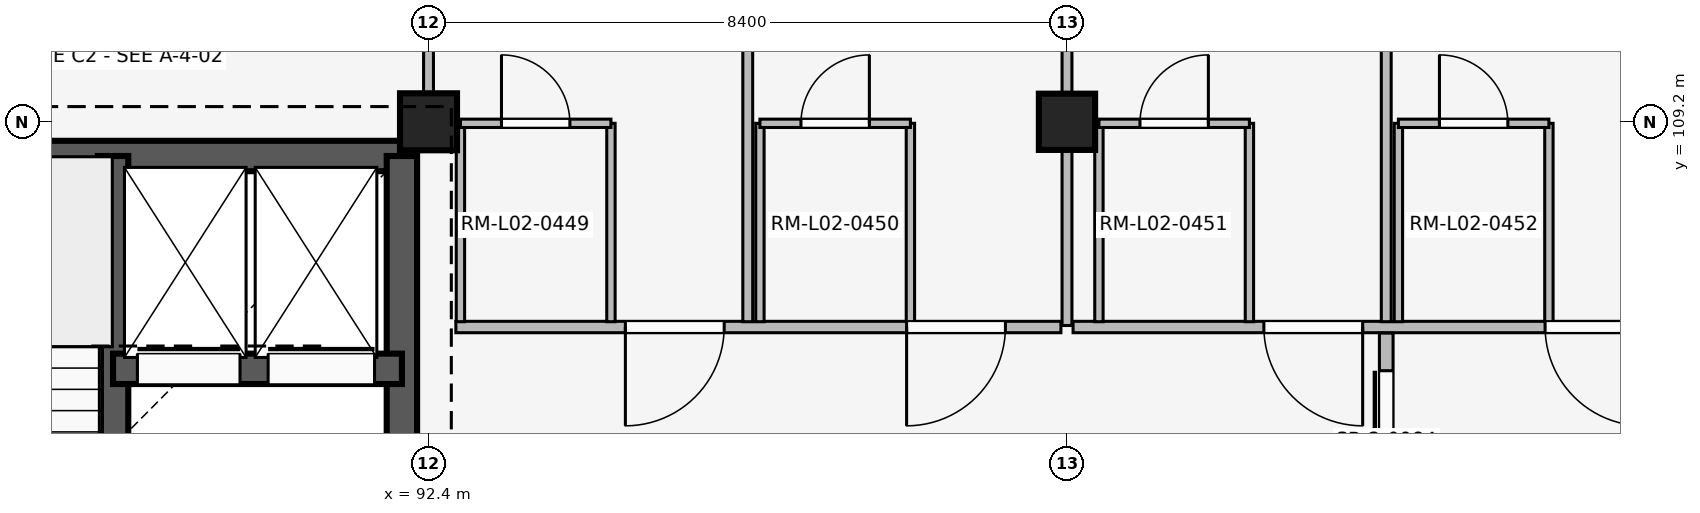
"""IFC4 building model, lengths in metres.
Left out: names, types, materials, properties, quantities, classifications, styles, units other than length and angle.
Written with IfcOpenShell. Run it as: python <this file> out.ifc"""

import sys

from ifc_helpers import new_model, si_unit, direction, frame, frame_2d, origin, origin_2d, place, context, subcontext, project, spatial, rectangle, extrude, element, fill, save


model = new_model("IFC4")
c1 = context("Model", 3, precision=1e-05, world=origin(), true_north=direction((0.0, 1.0)))
c2 = subcontext(c1, "Body", "Model", "MODEL_VIEW")
j1 = project(units=[si_unit("LENGTHUNIT", "METRE"), si_unit("PLANEANGLEUNIT", "RADIAN")], contexts=[c1])
p1 = place(None, origin())
s1 = spatial("IfcSite", under=j1, at=p1, CompositionType="ELEMENT")
p2 = place(p1, origin())
s2 = spatial("IfcBuilding", under=s1, at=p2, CompositionType="ELEMENT")
p3 = place(p2, frame((0.0, 0.0, 8.1)))
s3 = spatial("IfcBuildingStorey", under=s2, at=p3, CompositionType="ELEMENT", Elevation=8.1)
p4 = place(p3, frame((92.4, 109.2, 0.0), z_axis=(0.0, 0.0, 1.0), x_axis=(1.0, 0.0, 0.0)))
e1 = element("IfcColumn", 1, at=p4, inside=s3, PredefinedType="COLUMN", context=c2, shape_type="SweptSolid", body=[
    extrude(rectangle(XDim=0.75, YDim=0.75, at=origin_2d()), origin(), (0.0, 0.0, 1.0), 4.8),
])
p5 = place(p3, frame((100.8, 109.2, 0.0), z_axis=(0.0, 0.0, 1.0), x_axis=(1.0, 0.0, 0.0)))
e2 = element("IfcColumn", 2, at=p5, inside=s3, PredefinedType="COLUMN", context=c2, shape_type="SweptSolid", body=[
    extrude(rectangle(XDim=0.74, YDim=0.74, at=origin_2d()), origin(), (0.0, 0.0, 1.0), 4.8),
])
p6 = place(p3, frame((84.55, 108.75, 0.0), z_axis=(0.0, 0.0, 1.0), x_axis=(1.0, 0.0, 0.0)))
e3 = element("IfcWall", 3, at=p6, inside=s3, PredefinedType="SHEAR", context=c2, shape_type="SweptSolid", body=[
    extrude(rectangle(XDim=7.5, YDim=0.4, at=frame_2d((3.75, 0.0))), origin(), (0.0, 0.0, 1.0), 4.52),
])
p7 = place(p3, frame((92.05, 101.2, 0.0), z_axis=(0.0, 0.0, 1.0), x_axis=(0.0, 1.0, 0.0)))
e4 = element("IfcWall", 4, at=p7, inside=s3, PredefinedType="SHEAR", context=c2, shape_type="SweptSolid", body=[
    extrude(rectangle(XDim=7.55, YDim=0.4, at=frame_2d((3.775, 0.0))), origin(), (0.0, 0.0, 1.0), 4.52),
])
p8 = place(p7, frame((2.4, 0.0, 0.0)))
e5 = element("IfcOpeningElement", 5, at=p8, cuts=e4, PredefinedType="OPENING", context=c2, shape_type="SweptSolid", body=[
    extrude(rectangle(XDim=1.2, YDim=2.2, at=frame_2d((0.6, 1.1))), frame((0.0, 0.21, 0.0), z_axis=(0.0, -1.0, 0.0), x_axis=(1.0, 0.0, 0.0)), (0.0, 0.0, 1.0), 0.42),
])
p9 = place(p3, frame((88.25, 101.2, 0.0), z_axis=(0.0, 0.0, 1.0), x_axis=(0.0, 1.0, 0.0)))
e6 = element("IfcWall", 6, at=p9, inside=s3, PredefinedType="SHEAR", context=c2, shape_type="SweptSolid", body=[
    extrude(rectangle(XDim=7.55, YDim=0.4, at=frame_2d((3.775, 0.0))), origin(), (0.0, 0.0, 1.0), 4.52),
])
p10 = place(p9, frame((0.28, 0.0, 0.0)))
e7 = element("IfcOpeningElement", 7, at=p10, cuts=e6, PredefinedType="OPENING", context=c2, shape_type="SweptSolid", body=[
    extrude(rectangle(XDim=1.0, YDim=2.15, at=frame_2d((0.5, 1.075))), frame((0.0, 0.21, 0.0), z_axis=(0.0, -1.0, 0.0), x_axis=(1.0, 0.0, 0.0)), (0.0, 0.0, 1.0), 0.42),
])
p11 = place(p3, frame((88.25, 105.95, 0.0), z_axis=(0.0, 0.0, 1.0), x_axis=(1.0, 0.0, 0.0)))
e8 = element("IfcWall", 8, at=p11, inside=s3, PredefinedType="SHEAR", context=c2, shape_type="SweptSolid", body=[
    extrude(rectangle(XDim=3.8, YDim=0.4, at=frame_2d((1.9, 0.0))), origin(), (0.0, 0.0, 1.0), 4.52),
])
p12 = place(p11, frame((0.32, 0.0, 0.0)))
e9 = element("IfcOpeningElement", 9, at=p12, cuts=e8, PredefinedType="OPENING", context=c2, shape_type="SweptSolid", body=[
    extrude(rectangle(XDim=1.35, YDim=2.25, at=frame_2d((0.675, 1.125))), frame((0.0, 0.21, 0.0), z_axis=(0.0, -1.0, 0.0), x_axis=(1.0, 0.0, 0.0)), (0.0, 0.0, 1.0), 0.42),
])
p13 = place(p11, frame((2.04, 0.0, 0.0)))
e10 = element("IfcOpeningElement", 10, at=p13, cuts=e8, PredefinedType="OPENING", context=c2, shape_type="SweptSolid", body=[
    extrude(rectangle(XDim=1.4, YDim=2.25, at=frame_2d((0.7, 1.125))), frame((0.0, 0.21, 0.0), z_axis=(0.0, -1.0, 0.0), x_axis=(1.0, 0.0, 0.0)), (0.0, 0.0, 1.0), 0.42),
])
p14 = place(p3, frame((92.4, 109.55, 0.0), z_axis=(0.0, 0.0, 1.0), x_axis=(0.0, 1.0, 0.0)))
e11 = element("IfcWall", 11, at=p14, inside=s3, PredefinedType="PARTITIONING", context=c2, shape_type="SweptSolid", body=[
    extrude(rectangle(XDim=7.91, YDim=0.13, at=frame_2d((3.955, 0.0))), origin(), (0.0, 0.0, 1.0), 3.84),
])
p15 = place(p14, frame((3.4, 0.0, 0.0)))
e12 = element("IfcOpeningElement", 12, at=p15, cuts=e11, PredefinedType="OPENING", context=c2, shape_type="SweptSolid", body=[
    extrude(rectangle(XDim=1.05, YDim=2.2, at=frame_2d((0.525, 1.1))), frame((0.0, 0.075, 0.0), z_axis=(0.0, -1.0, 0.0), x_axis=(1.0, 0.0, 0.0)), (0.0, 0.0, 1.0), 0.15),
])
p16 = place(p3, frame((100.72, 106.5, 0.0), z_axis=(0.0, 0.0, 1.0), x_axis=(-1.0, 0.0, 0.0)))
e13 = element("IfcWall", 13, at=p16, inside=s3, PredefinedType="PARTITIONING", context=c2, shape_type="SweptSolid", body=[
    extrude(rectangle(XDim=7.96, YDim=0.15, at=frame_2d((3.98, 0.0))), origin(), (0.0, 0.0, 1.0), 3.84),
])
p17 = place(p16, frame((0.73, 0.0, 0.0)))
e14 = element("IfcOpeningElement", 14, at=p17, cuts=e13, PredefinedType="OPENING", context=c2, shape_type="SweptSolid", body=[
    extrude(rectangle(XDim=1.3, YDim=2.25, at=frame_2d((0.65, 1.125))), frame((0.0, 0.085, 0.0), z_axis=(0.0, -1.0, 0.0), x_axis=(1.0, 0.0, 0.0)), (0.0, 0.0, 1.0), 0.17),
])
p18 = place(p16, frame((4.43, 0.0, 0.0)))
e15 = element("IfcOpeningElement", 15, at=p18, cuts=e13, PredefinedType="OPENING", context=c2, shape_type="SweptSolid", body=[
    extrude(rectangle(XDim=1.3, YDim=2.25, at=frame_2d((0.65, 1.125))), frame((0.0, 0.085, 0.0), z_axis=(0.0, -1.0, 0.0), x_axis=(1.0, 0.0, 0.0)), (0.0, 0.0, 1.0), 0.17),
])
p19 = place(p3, frame((96.6, 106.57, 0.0), z_axis=(0.0, 0.0, 1.0), x_axis=(0.0, 1.0, 0.0)))
e16 = element("IfcWall", 16, at=p19, inside=s3, PredefinedType="PARTITIONING", context=c2, shape_type="SweptSolid", body=[
    extrude(rectangle(XDim=10.93, YDim=0.13, at=frame_2d((5.465, 0.0))), origin(), (0.0, 0.0, 1.0), 3.84),
])
for number, where, z_axis, x_axis in (
    (17, (92.82, 106.57, 0.0), (0.0, 0.0, 1.0), (0.0, 1.0, 0.0)),
    (18, (94.8, 106.57, 0.0), (0.0, 0.0, 1.0), (0.0, 1.0, 0.0)),
):
    element("IfcWall", number, at=place(p3, frame(where, z_axis=z_axis, x_axis=x_axis)), inside=s3, PredefinedType="PARTITIONING", context=c2, shape_type="SweptSolid", body=[
        extrude(rectangle(XDim=2.61, YDim=0.11, at=frame_2d((1.305, 0.0))), origin(), (0.0, 0.0, 1.0), 3.84),
    ])
p20 = place(p3, frame((92.82, 109.18, 0.0), z_axis=(0.0, 0.0, 1.0), x_axis=(1.0, 0.0, 0.0)))
e19 = element("IfcWall", 19, at=p20, inside=s3, PredefinedType="PARTITIONING", context=c2, shape_type="SweptSolid", body=[
    extrude(rectangle(XDim=1.98, YDim=0.11, at=frame_2d((0.99, 0.0))), origin(), (0.0, 0.0, 1.0), 3.84),
])
p21 = place(p20, frame((0.54, 0.0, 0.0)))
e20 = element("IfcOpeningElement", 20, at=p21, cuts=e19, PredefinedType="OPENING", context=c2, shape_type="SweptSolid", body=[
    extrude(rectangle(XDim=0.9, YDim=2.1, at=frame_2d((0.45, 1.05))), frame((0.0, 0.065, 0.0), z_axis=(0.0, -1.0, 0.0), x_axis=(1.0, 0.0, 0.0)), (0.0, 0.0, 1.0), 0.13),
])
for number, where, z_axis, x_axis in (
    (21, (96.76, 106.57, 0.0), (0.0, 0.0, 1.0), (0.0, 1.0, 0.0)),
    (22, (98.74, 106.57, 0.0), (0.0, 0.0, 1.0), (0.0, 1.0, 0.0)),
):
    element("IfcWall", number, at=place(p3, frame(where, z_axis=z_axis, x_axis=x_axis)), inside=s3, PredefinedType="PARTITIONING", context=c2, shape_type="SweptSolid", body=[
        extrude(rectangle(XDim=2.61, YDim=0.11, at=frame_2d((1.305, 0.0))), origin(), (0.0, 0.0, 1.0), 3.84),
    ])
p22 = place(p3, frame((96.76, 109.18, 0.0), z_axis=(0.0, 0.0, 1.0), x_axis=(1.0, 0.0, 0.0)))
e23 = element("IfcWall", 23, at=p22, inside=s3, PredefinedType="PARTITIONING", context=c2, shape_type="SweptSolid", body=[
    extrude(rectangle(XDim=1.98, YDim=0.11, at=frame_2d((0.99, 0.0))), origin(), (0.0, 0.0, 1.0), 3.84),
])
p23 = place(p22, frame((0.54, 0.0, 0.0)))
e24 = element("IfcOpeningElement", 24, at=p23, cuts=e23, PredefinedType="OPENING", context=c2, shape_type="SweptSolid", body=[
    extrude(rectangle(XDim=0.9, YDim=2.1, at=frame_2d((0.45, 1.05))), frame((0.0, 0.065, 0.0), z_axis=(0.0, -1.0, 0.0), x_axis=(1.0, 0.0, 0.0)), (0.0, 0.0, 1.0), 0.13),
])
p24 = place(p3, frame((100.8, 106.52, 0.0), z_axis=(0.0, 0.0, 1.0), x_axis=(0.0, 1.0, 0.0)))
e25 = element("IfcWall", 25, at=p24, inside=s3, PredefinedType="PARTITIONING", context=c2, shape_type="SweptSolid", body=[
    extrude(rectangle(XDim=10.94, YDim=0.13, at=frame_2d((5.47, 0.0))), origin(), (0.0, 0.0, 1.0), 3.84),
])
p25 = place(p3, frame((109.12, 106.5, 0.0), z_axis=(0.0, 0.0, 1.0), x_axis=(-1.0, 0.0, 0.0)))
e26 = element("IfcWall", 26, at=p25, inside=s3, PredefinedType="PARTITIONING", context=c2, shape_type="SweptSolid", body=[
    extrude(rectangle(XDim=8.24, YDim=0.15, at=frame_2d((4.12, 0.0))), origin(), (0.0, 0.0, 1.0), 3.84),
])
p26 = place(p25, frame((0.73, 0.0, 0.0)))
e27 = element("IfcOpeningElement", 27, at=p26, cuts=e26, PredefinedType="OPENING", context=c2, shape_type="SweptSolid", body=[
    extrude(rectangle(XDim=1.3, YDim=2.25, at=frame_2d((0.65, 1.125))), frame((0.0, 0.085, 0.0), z_axis=(0.0, -1.0, 0.0), x_axis=(1.0, 0.0, 0.0)), (0.0, 0.0, 1.0), 0.17),
])
p27 = place(p25, frame((4.43, 0.0, 0.0)))
e28 = element("IfcOpeningElement", 28, at=p27, cuts=e26, PredefinedType="OPENING", context=c2, shape_type="SweptSolid", body=[
    extrude(rectangle(XDim=1.3, YDim=2.25, at=frame_2d((0.65, 1.125))), frame((0.0, 0.085, 0.0), z_axis=(0.0, -1.0, 0.0), x_axis=(1.0, 0.0, 0.0)), (0.0, 0.0, 1.0), 0.17),
])
p28 = place(p3, frame((105.0, 106.57, 0.0), z_axis=(0.0, 0.0, 1.0), x_axis=(0.0, 1.0, 0.0)))
e29 = element("IfcWall", 29, at=p28, inside=s3, PredefinedType="PARTITIONING", context=c2, shape_type="SweptSolid", body=[
    extrude(rectangle(XDim=10.93, YDim=0.13, at=frame_2d((5.465, 0.0))), origin(), (0.0, 0.0, 1.0), 3.84),
])
for number, where, z_axis, x_axis in (
    (30, (101.22, 106.57, 0.0), (0.0, 0.0, 1.0), (0.0, 1.0, 0.0)),
    (31, (103.2, 106.57, 0.0), (0.0, 0.0, 1.0), (0.0, 1.0, 0.0)),
):
    element("IfcWall", number, at=place(p3, frame(where, z_axis=z_axis, x_axis=x_axis)), inside=s3, PredefinedType="PARTITIONING", context=c2, shape_type="SweptSolid", body=[
        extrude(rectangle(XDim=2.61, YDim=0.11, at=frame_2d((1.305, 0.0))), origin(), (0.0, 0.0, 1.0), 3.84),
    ])
p29 = place(p3, frame((101.22, 109.18, 0.0), z_axis=(0.0, 0.0, 1.0), x_axis=(1.0, 0.0, 0.0)))
e32 = element("IfcWall", 32, at=p29, inside=s3, PredefinedType="PARTITIONING", context=c2, shape_type="SweptSolid", body=[
    extrude(rectangle(XDim=1.98, YDim=0.11, at=frame_2d((0.99, 0.0))), origin(), (0.0, 0.0, 1.0), 3.84),
])
p30 = place(p29, frame((0.54, 0.0, 0.0)))
e33 = element("IfcOpeningElement", 33, at=p30, cuts=e32, PredefinedType="OPENING", context=c2, shape_type="SweptSolid", body=[
    extrude(rectangle(XDim=0.9, YDim=2.1, at=frame_2d((0.45, 1.05))), frame((0.0, 0.065, 0.0), z_axis=(0.0, -1.0, 0.0), x_axis=(1.0, 0.0, 0.0)), (0.0, 0.0, 1.0), 0.13),
])
for number, where, z_axis, x_axis in (
    (34, (105.16, 106.57, 0.0), (0.0, 0.0, 1.0), (0.0, 1.0, 0.0)),
    (35, (107.14, 106.57, 0.0), (0.0, 0.0, 1.0), (0.0, 1.0, 0.0)),
):
    element("IfcWall", number, at=place(p3, frame(where, z_axis=z_axis, x_axis=x_axis)), inside=s3, PredefinedType="PARTITIONING", context=c2, shape_type="SweptSolid", body=[
        extrude(rectangle(XDim=2.61, YDim=0.11, at=frame_2d((1.305, 0.0))), origin(), (0.0, 0.0, 1.0), 3.84),
    ])
p31 = place(p3, frame((105.16, 109.18, 0.0), z_axis=(0.0, 0.0, 1.0), x_axis=(1.0, 0.0, 0.0)))
e36 = element("IfcWall", 36, at=p31, inside=s3, PredefinedType="PARTITIONING", context=c2, shape_type="SweptSolid", body=[
    extrude(rectangle(XDim=1.98, YDim=0.11, at=frame_2d((0.99, 0.0))), origin(), (0.0, 0.0, 1.0), 3.84),
])
p32 = place(p31, frame((0.54, 0.0, 0.0)))
e37 = element("IfcOpeningElement", 37, at=p32, cuts=e36, PredefinedType="OPENING", context=c2, shape_type="SweptSolid", body=[
    extrude(rectangle(XDim=0.9, YDim=2.1, at=frame_2d((0.45, 1.05))), frame((0.0, 0.065, 0.0), z_axis=(0.0, -1.0, 0.0), x_axis=(1.0, 0.0, 0.0)), (0.0, 0.0, 1.0), 0.13),
])
p33 = place(p3, frame((105.0, 103.58, 0.0), z_axis=(0.0, 0.0, 1.0), x_axis=(0.0, 1.0, 0.0)))
e38 = element("IfcWall", 38, at=p33, inside=s3, PredefinedType="PARTITIONING", context=c2, shape_type="SweptSolid", body=[
    extrude(rectangle(XDim=2.84, YDim=0.18, at=frame_2d((1.42, 0.0))), origin(), (0.0, 0.0, 1.0), 3.84),
])
p34 = place(p33, frame((0.495, 0.0, 0.0)))
e39 = element("IfcOpeningElement", 39, at=p34, cuts=e38, PredefinedType="OPENING", context=c2, shape_type="SweptSolid", body=[
    extrude(rectangle(XDim=1.85, YDim=2.3, at=frame_2d((0.925, 1.15))), frame((0.0, 0.1, 0.0), z_axis=(0.0, -1.0, 0.0), x_axis=(1.0, 0.0, 0.0)), (0.0, 0.0, 1.0), 0.2),
])
p35 = place(p12, origin())
e40 = element("IfcDoor", 40, at=p35, inside=s3, OperationType="SLIDING_TO_LEFT", PredefinedType="DOOR", context=c2, shape_type="SweptSolid", body=[
    extrude(rectangle(XDim=1.35, YDim=2.25, at=frame_2d((0.675, 1.125))), frame((0.0, 0.025, 0.0), z_axis=(0.0, -1.0, 0.0), x_axis=(1.0, 0.0, 0.0)), (0.0, 0.0, 1.0), 0.05),
])
fill(e9, e40)
p36 = place(p13, origin())
e41 = element("IfcDoor", 41, at=p36, inside=s3, OperationType="SLIDING_TO_LEFT", PredefinedType="DOOR", context=c2, shape_type="SweptSolid", body=[
    extrude(rectangle(XDim=1.4, YDim=2.25, at=frame_2d((0.7, 1.125))), frame((0.0, 0.025, 0.0), z_axis=(0.0, -1.0, 0.0), x_axis=(1.0, 0.0, 0.0)), (0.0, 0.0, 1.0), 0.05),
])
fill(e10, e41)
p37 = place(p17, origin())
e42 = element("IfcDoor", 42, at=p37, inside=s3, OperationType="SINGLE_SWING_RIGHT", PredefinedType="DOOR", context=c2, shape_type="SweptSolid", body=[
    extrude(rectangle(XDim=1.3, YDim=2.25, at=frame_2d((0.65, 1.125))), frame((0.0, 0.025, 0.0), z_axis=(0.0, -1.0, 0.0), x_axis=(1.0, 0.0, 0.0)), (0.0, 0.0, 1.0), 0.05),
])
fill(e14, e42)
p38 = place(p18, origin())
e43 = element("IfcDoor", 43, at=p38, inside=s3, OperationType="SINGLE_SWING_RIGHT", PredefinedType="DOOR", context=c2, shape_type="SweptSolid", body=[
    extrude(rectangle(XDim=1.3, YDim=2.25, at=frame_2d((0.65, 1.125))), frame((0.0, 0.025, 0.0), z_axis=(0.0, -1.0, 0.0), x_axis=(1.0, 0.0, 0.0)), (0.0, 0.0, 1.0), 0.05),
])
fill(e15, e43)
p39 = place(p21, origin())
e44 = element("IfcDoor", 44, at=p39, inside=s3, OperationType="SINGLE_SWING_LEFT", PredefinedType="DOOR", context=c2, shape_type="SweptSolid", body=[
    extrude(rectangle(XDim=0.9, YDim=2.1, at=frame_2d((0.45, 1.05))), frame((0.0, 0.025, 0.0), z_axis=(0.0, -1.0, 0.0), x_axis=(1.0, 0.0, 0.0)), (0.0, 0.0, 1.0), 0.05),
])
fill(e20, e44)
p40 = place(p23, origin())
e45 = element("IfcDoor", 45, at=p40, inside=s3, OperationType="SINGLE_SWING_RIGHT", PredefinedType="DOOR", context=c2, shape_type="SweptSolid", body=[
    extrude(rectangle(XDim=0.9, YDim=2.1, at=frame_2d((0.45, 1.05))), frame((0.0, 0.025, 0.0), z_axis=(0.0, -1.0, 0.0), x_axis=(1.0, 0.0, 0.0)), (0.0, 0.0, 1.0), 0.05),
])
fill(e24, e45)
p41 = place(p26, origin())
e46 = element("IfcDoor", 46, at=p41, inside=s3, OperationType="SINGLE_SWING_LEFT", PredefinedType="DOOR", context=c2, shape_type="SweptSolid", body=[
    extrude(rectangle(XDim=1.3, YDim=2.25, at=frame_2d((0.65, 1.125))), frame((0.0, 0.025, 0.0), z_axis=(0.0, -1.0, 0.0), x_axis=(1.0, 0.0, 0.0)), (0.0, 0.0, 1.0), 0.05),
])
fill(e27, e46)
p42 = place(p27, origin())
e47 = element("IfcDoor", 47, at=p42, inside=s3, OperationType="SINGLE_SWING_LEFT", PredefinedType="DOOR", context=c2, shape_type="SweptSolid", body=[
    extrude(rectangle(XDim=1.3, YDim=2.25, at=frame_2d((0.65, 1.125))), frame((0.0, 0.025, 0.0), z_axis=(0.0, -1.0, 0.0), x_axis=(1.0, 0.0, 0.0)), (0.0, 0.0, 1.0), 0.05),
])
fill(e28, e47)
p43 = place(p30, origin())
e48 = element("IfcDoor", 48, at=p43, inside=s3, OperationType="SINGLE_SWING_RIGHT", PredefinedType="DOOR", context=c2, shape_type="SweptSolid", body=[
    extrude(rectangle(XDim=0.9, YDim=2.1, at=frame_2d((0.45, 1.05))), frame((0.0, 0.025, 0.0), z_axis=(0.0, -1.0, 0.0), x_axis=(1.0, 0.0, 0.0)), (0.0, 0.0, 1.0), 0.05),
])
fill(e33, e48)
p44 = place(p32, origin())
e49 = element("IfcDoor", 49, at=p44, inside=s3, OperationType="SINGLE_SWING_LEFT", PredefinedType="DOOR", context=c2, shape_type="SweptSolid", body=[
    extrude(rectangle(XDim=0.9, YDim=2.1, at=frame_2d((0.45, 1.05))), frame((0.0, 0.025, 0.0), z_axis=(0.0, -1.0, 0.0), x_axis=(1.0, 0.0, 0.0)), (0.0, 0.0, 1.0), 0.05),
])
fill(e37, e49)
p45 = place(p34, origin())
e50 = element("IfcDoor", 50, at=p45, inside=s3, OperationType="SLIDING_TO_LEFT", PredefinedType="DOOR", context=c2, shape_type="SweptSolid", body=[
    extrude(rectangle(XDim=1.85, YDim=2.3, at=frame_2d((0.925, 1.15))), frame((0.0, 0.025, 0.0), z_axis=(0.0, -1.0, 0.0), x_axis=(1.0, 0.0, 0.0)), (0.0, 0.0, 1.0), 0.05),
])
fill(e39, e50)
save(model, sys.argv[1])
